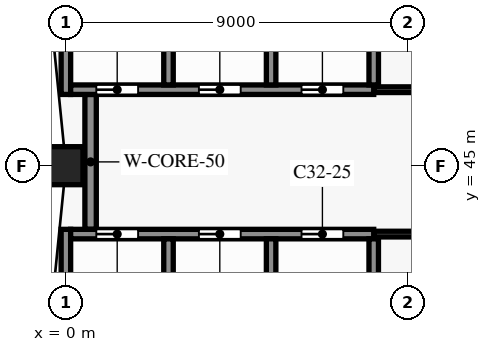
"""IFC4 building model, lengths in metres.
Left out: names, types, materials, properties, quantities, classifications, styles, units other than length and angle.
Written with IfcOpenShell. Run it as: python <this file> out.ifc"""

import sys

from ifc_helpers import new_model, si_unit, direction, frame, frame_2d, origin, origin_2d, place, context, subcontext, project, spatial, rectangle, extrude, element, fill, save


model = new_model("IFC4")
c1 = context("Model", 3, precision=1e-05, world=origin(), true_north=direction((0.0, 1.0)))
c2 = subcontext(c1, "Body", "Model", "MODEL_VIEW")
j1 = project(units=[si_unit("LENGTHUNIT", "METRE"), si_unit("PLANEANGLEUNIT", "RADIAN")], contexts=[c1])
p1 = place(None, origin())
s1 = spatial("IfcSite", under=j1, at=p1, CompositionType="ELEMENT")
p2 = place(p1, origin())
s2 = spatial("IfcBuilding", under=s1, at=p2, CompositionType="ELEMENT")
p3 = place(p2, frame((0.0, 0.0, 240.6)))
s3 = spatial("IfcBuildingStorey", under=s2, at=p3, CompositionType="ELEMENT", Elevation=240.6)
p4 = place(p3, frame((0.0, 45.0, 0.0), z_axis=(0.0, 0.0, 1.0), x_axis=(0.0, -1.0, 0.0)))
e1 = element("IfcColumn", 1, at=p4, inside=s3, PredefinedType="COLUMN", context=c2, shape_type="SweptSolid", body=[
    extrude(rectangle(XDim=0.9, YDim=1.0, at=origin_2d()), origin(), (0.0, 0.0, 1.0), 3.8),
])
p5 = place(p3, frame((8.1, 43.2, 0.0), z_axis=(0.0, 0.0, 1.0), x_axis=(1.0, 0.0, 0.0)))
e2 = element("IfcWall", 2, at=p5, inside=s3, PredefinedType="PARTITIONING", context=c2, shape_type="SweptSolid", body=[
    extrude(rectangle(XDim=16.125, YDim=0.15, at=frame_2d((8.062, 0.0))), origin(), (0.0, 0.0, 1.0), 3.5),
])
p6 = place(p5, frame((1.575, 0.0, 0.0)))
e3 = element("IfcOpeningElement", 3, at=p6, cuts=e2, PredefinedType="OPENING", context=c2, shape_type="SweptSolid", body=[
    extrude(rectangle(XDim=0.9, YDim=2.1, at=frame_2d((0.45, 1.05))), frame((0.0, 0.085, 0.0), z_axis=(0.0, -1.0, 0.0), x_axis=(1.0, 0.0, 0.0)), (0.0, 0.0, 1.0), 0.17),
])
p7 = place(p5, frame((9.675, 0.0, 0.0)))
e4 = element("IfcOpeningElement", 4, at=p7, cuts=e2, PredefinedType="OPENING", context=c2, shape_type="SweptSolid", body=[
    extrude(rectangle(XDim=0.9, YDim=2.1, at=frame_2d((0.45, 1.05))), frame((0.0, 0.085, 0.0), z_axis=(0.0, -1.0, 0.0), x_axis=(1.0, 0.0, 0.0)), (0.0, 0.0, 1.0), 0.17),
])
p8 = place(p3, frame((0.125, 43.2, 0.0), z_axis=(0.0, 0.0, 1.0), x_axis=(1.0, 0.0, 0.0)))
e5 = element("IfcWall", 5, at=p8, inside=s3, PredefinedType="SHEAR", context=c2, shape_type="SweptSolid", body=[
    extrude(rectangle(XDim=7.975, YDim=0.25, at=frame_2d((3.988, 0.0))), origin(), (0.0, 0.0, 1.0), 3.5),
])
p9 = place(p8, frame((0.675, 0.0, 0.0)))
e6 = element("IfcOpeningElement", 6, at=p9, cuts=e5, PredefinedType="OPENING", context=c2, shape_type="SweptSolid", body=[
    extrude(rectangle(XDim=1.1, YDim=2.1, at=frame_2d((0.55, 1.05))), frame((0.0, 0.135, 0.0), z_axis=(0.0, -1.0, 0.0), x_axis=(1.0, 0.0, 0.0)), (0.0, 0.0, 1.0), 0.27),
])
p10 = place(p8, frame((3.375, 0.0, 0.0)))
e7 = element("IfcOpeningElement", 7, at=p10, cuts=e5, PredefinedType="OPENING", context=c2, shape_type="SweptSolid", body=[
    extrude(rectangle(XDim=1.1, YDim=2.1, at=frame_2d((0.55, 1.05))), frame((0.0, 0.135, 0.0), z_axis=(0.0, -1.0, 0.0), x_axis=(1.0, 0.0, 0.0)), (0.0, 0.0, 1.0), 0.27),
])
p11 = place(p8, frame((6.075, 0.0, 0.0)))
e8 = element("IfcOpeningElement", 8, at=p11, cuts=e5, PredefinedType="OPENING", context=c2, shape_type="SweptSolid", body=[
    extrude(rectangle(XDim=1.1, YDim=2.1, at=frame_2d((0.55, 1.05))), frame((0.0, 0.135, 0.0), z_axis=(0.0, -1.0, 0.0), x_axis=(1.0, 0.0, 0.0)), (0.0, 0.0, 1.0), 0.27),
])
p12 = place(p3, frame((8.1, 47.0, 0.0), z_axis=(0.0, 0.0, 1.0), x_axis=(1.0, 0.0, 0.0)))
e9 = element("IfcWall", 9, at=p12, inside=s3, PredefinedType="PARTITIONING", context=c2, shape_type="SweptSolid", body=[
    extrude(rectangle(XDim=13.5, YDim=0.15, at=frame_2d((6.75, 0.0))), origin(), (0.0, 0.0, 1.0), 3.5),
])
p13 = place(p12, frame((1.25, 0.0, 0.0)))
e10 = element("IfcOpeningElement", 10, at=p13, cuts=e9, PredefinedType="OPENING", context=c2, shape_type="SweptSolid", body=[
    extrude(rectangle(XDim=0.9, YDim=2.1, at=frame_2d((0.45, 1.05))), frame((0.0, 0.085, 0.0), z_axis=(0.0, -1.0, 0.0), x_axis=(1.0, 0.0, 0.0)), (0.0, 0.0, 1.0), 0.17),
])
p14 = place(p12, frame((8.0, 0.0, 0.0)))
e11 = element("IfcOpeningElement", 11, at=p14, cuts=e9, PredefinedType="OPENING", context=c2, shape_type="SweptSolid", body=[
    extrude(rectangle(XDim=0.9, YDim=2.1, at=frame_2d((0.45, 1.05))), frame((0.0, 0.085, 0.0), z_axis=(0.0, -1.0, 0.0), x_axis=(1.0, 0.0, 0.0)), (0.0, 0.0, 1.0), 0.17),
])
p15 = place(p3, frame((0.125, 47.0, 0.0), z_axis=(0.0, 0.0, 1.0), x_axis=(1.0, 0.0, 0.0)))
e12 = element("IfcWall", 12, at=p15, inside=s3, PredefinedType="SHEAR", context=c2, shape_type="SweptSolid", body=[
    extrude(rectangle(XDim=7.975, YDim=0.25, at=frame_2d((3.988, 0.0))), origin(), (0.0, 0.0, 1.0), 3.5),
])
p16 = place(p15, frame((0.675, 0.0, 0.0)))
e13 = element("IfcOpeningElement", 13, at=p16, cuts=e12, PredefinedType="OPENING", context=c2, shape_type="SweptSolid", body=[
    extrude(rectangle(XDim=1.1, YDim=2.1, at=frame_2d((0.55, 1.05))), frame((0.0, 0.135, 0.0), z_axis=(0.0, -1.0, 0.0), x_axis=(1.0, 0.0, 0.0)), (0.0, 0.0, 1.0), 0.27),
])
p17 = place(p15, frame((3.375, 0.0, 0.0)))
e14 = element("IfcOpeningElement", 14, at=p17, cuts=e12, PredefinedType="OPENING", context=c2, shape_type="SweptSolid", body=[
    extrude(rectangle(XDim=1.1, YDim=2.1, at=frame_2d((0.55, 1.05))), frame((0.0, 0.135, 0.0), z_axis=(0.0, -1.0, 0.0), x_axis=(1.0, 0.0, 0.0)), (0.0, 0.0, 1.0), 0.27),
])
p18 = place(p15, frame((6.075, 0.0, 0.0)))
e15 = element("IfcOpeningElement", 15, at=p18, cuts=e12, PredefinedType="OPENING", context=c2, shape_type="SweptSolid", body=[
    extrude(rectangle(XDim=1.1, YDim=2.1, at=frame_2d((0.55, 1.05))), frame((0.0, 0.135, 0.0), z_axis=(0.0, -1.0, 0.0), x_axis=(1.0, 0.0, 0.0)), (0.0, 0.0, 1.0), 0.27),
])
p19 = place(p3, frame((0.0, 40.0, 0.0), z_axis=(0.0, 0.0, 1.0), x_axis=(0.0, 1.0, 0.0)))
e16 = element("IfcWall", 16, at=p19, inside=s3, PredefinedType="SHEAR", context=c2, shape_type="SweptSolid", body=[
    extrude(rectangle(XDim=3.325, YDim=0.25, at=frame_2d((1.663, 0.0))), origin(), (0.0, 0.0, 1.0), 3.5),
])
p20 = place(p3, frame((0.0, 46.875, 0.0), z_axis=(0.0, 0.0, 1.0), x_axis=(0.0, 1.0, 0.0)))
e17 = element("IfcWall", 17, at=p20, inside=s3, PredefinedType="SHEAR", context=c2, shape_type="SweptSolid", body=[
    extrude(rectangle(XDim=3.475, YDim=0.25, at=frame_2d((1.738, 0.0))), origin(), (0.0, 0.0, 1.0), 3.5),
])
p21 = place(p3, frame((0.65, 43.325, 0.0), z_axis=(0.0, 0.0, 1.0), x_axis=(0.0, 1.0, 0.0)))
e18 = element("IfcWall", 18, at=p21, inside=s3, PredefinedType="SHEAR", context=c2, shape_type="SweptSolid", body=[
    extrude(rectangle(XDim=3.55, YDim=0.3, at=frame_2d((1.775, 0.0))), origin(), (0.0, 0.0, 1.0), 3.5),
])
for number, where, z_axis, x_axis in (
    (19, (2.7, 40.125, 0.0), (0.0, 0.0, 1.0), (0.0, 1.0, 0.0)),
    (20, (2.7, 47.125, 0.0), (0.0, 0.0, 1.0), (0.0, 1.0, 0.0)),
    (21, (5.4, 40.125, 0.0), (0.0, 0.0, 1.0), (0.0, 1.0, 0.0)),
    (22, (5.4, 47.125, 0.0), (0.0, 0.0, 1.0), (0.0, 1.0, 0.0)),
    (23, (8.1, 40.125, 0.0), (0.0, 0.0, 1.0), (0.0, 1.0, 0.0)),
):
    element("IfcWall", number, at=place(p3, frame(where, z_axis=z_axis, x_axis=x_axis)), inside=s3, PredefinedType="SHEAR", context=c2, shape_type="SweptSolid", body=[
        extrude(rectangle(XDim=2.95, YDim=0.25, at=frame_2d((1.475, 0.0))), origin(), (0.0, 0.0, 1.0), 3.5),
    ])
p22 = place(p3, frame((8.1, 47.125, 0.0), z_axis=(0.0, 0.0, 1.0), x_axis=(0.0, 1.0, 0.0)))
e24 = element("IfcWall", 24, at=p22, inside=s3, PredefinedType="SHEAR", context=c2, shape_type="SweptSolid", body=[
    extrude(rectangle(XDim=3.075, YDim=0.25, at=frame_2d((1.538, 0.0))), origin(), (0.0, 0.0, 1.0), 3.5),
])
p23 = place(p9, origin())
e25 = element("IfcDoor", 25, at=p23, inside=s3, OperationType="DOUBLE_DOOR_SLIDING", PredefinedType="DOOR", context=c2, shape_type="SweptSolid", body=[
    extrude(rectangle(XDim=1.1, YDim=2.1, at=frame_2d((0.55, 1.05))), frame((0.0, 0.025, 0.0), z_axis=(0.0, -1.0, 0.0), x_axis=(1.0, 0.0, 0.0)), (0.0, 0.0, 1.0), 0.05),
])
fill(e6, e25)
p24 = place(p10, origin())
e26 = element("IfcDoor", 26, at=p24, inside=s3, OperationType="DOUBLE_DOOR_SLIDING", PredefinedType="DOOR", context=c2, shape_type="SweptSolid", body=[
    extrude(rectangle(XDim=1.1, YDim=2.1, at=frame_2d((0.55, 1.05))), frame((0.0, 0.025, 0.0), z_axis=(0.0, -1.0, 0.0), x_axis=(1.0, 0.0, 0.0)), (0.0, 0.0, 1.0), 0.05),
])
fill(e7, e26)
p25 = place(p11, origin())
e27 = element("IfcDoor", 27, at=p25, inside=s3, OperationType="DOUBLE_DOOR_SLIDING", PredefinedType="DOOR", context=c2, shape_type="SweptSolid", body=[
    extrude(rectangle(XDim=1.1, YDim=2.1, at=frame_2d((0.55, 1.05))), frame((0.0, 0.025, 0.0), z_axis=(0.0, -1.0, 0.0), x_axis=(1.0, 0.0, 0.0)), (0.0, 0.0, 1.0), 0.05),
])
fill(e8, e27)
p26 = place(p16, origin())
e28 = element("IfcDoor", 28, at=p26, inside=s3, OperationType="DOUBLE_DOOR_SLIDING", PredefinedType="DOOR", context=c2, shape_type="SweptSolid", body=[
    extrude(rectangle(XDim=1.1, YDim=2.1, at=frame_2d((0.55, 1.05))), frame((0.0, 0.025, 0.0), z_axis=(0.0, -1.0, 0.0), x_axis=(1.0, 0.0, 0.0)), (0.0, 0.0, 1.0), 0.05),
])
fill(e13, e28)
p27 = place(p17, origin())
e29 = element("IfcDoor", 29, at=p27, inside=s3, OperationType="DOUBLE_DOOR_SLIDING", PredefinedType="DOOR", context=c2, shape_type="SweptSolid", body=[
    extrude(rectangle(XDim=1.1, YDim=2.1, at=frame_2d((0.55, 1.05))), frame((0.0, 0.025, 0.0), z_axis=(0.0, -1.0, 0.0), x_axis=(1.0, 0.0, 0.0)), (0.0, 0.0, 1.0), 0.05),
])
fill(e14, e29)
p28 = place(p18, origin())
e30 = element("IfcDoor", 30, at=p28, inside=s3, OperationType="DOUBLE_DOOR_SLIDING", PredefinedType="DOOR", context=c2, shape_type="SweptSolid", body=[
    extrude(rectangle(XDim=1.1, YDim=2.1, at=frame_2d((0.55, 1.05))), frame((0.0, 0.025, 0.0), z_axis=(0.0, -1.0, 0.0), x_axis=(1.0, 0.0, 0.0)), (0.0, 0.0, 1.0), 0.05),
])
fill(e15, e30)
save(model, sys.argv[1])
